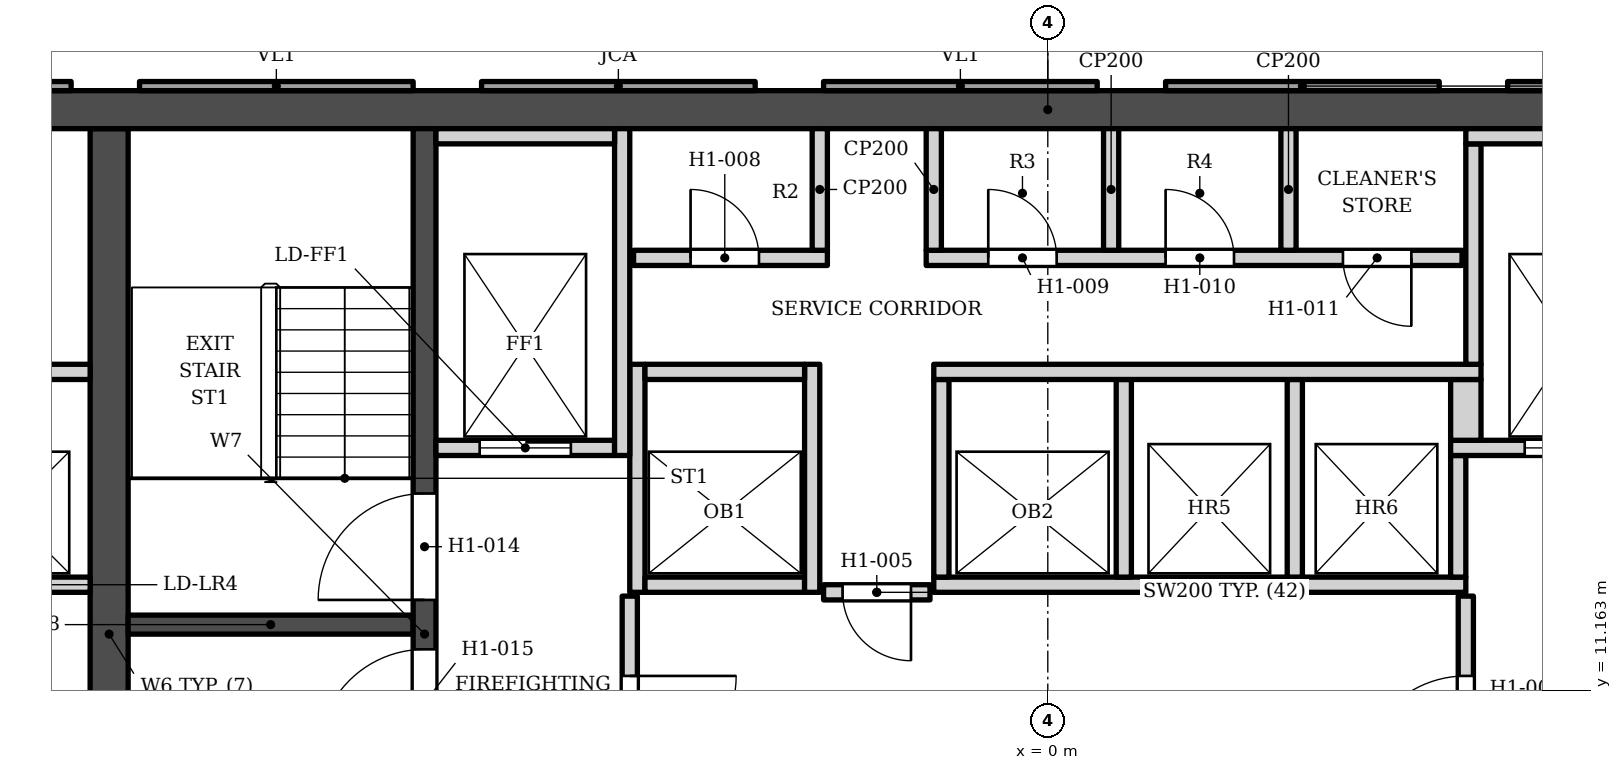
"""IFC4 building model, lengths in metres.
Left out: names, types, materials, properties, quantities, classifications, styles, units other than length and angle.
Written with IfcOpenShell. Run it as: python <this file> out.ifc"""

import sys

from ifc_helpers import new_model, si_unit, direction, frame, frame_2d, origin, place, context, subcontext, project, spatial, polyline, rectangle, outline, extrude, element, fill, save


model = new_model("IFC4")
c1 = context("Model", 3, precision=1e-05, world=origin(), true_north=direction((0.0, 1.0)))
c2 = subcontext(c1, "Body", "Model", "MODEL_VIEW")
j1 = project(units=[si_unit("LENGTHUNIT", "METRE"), si_unit("PLANEANGLEUNIT", "RADIAN")], contexts=[c1])
p1 = place(None, origin())
s1 = spatial("IfcSite", under=j1, at=p1, CompositionType="ELEMENT")
p2 = place(p1, origin())
s2 = spatial("IfcBuilding", under=s1, at=p2, CompositionType="ELEMENT")
p3 = place(p2, frame((0.0, 0.0, 46.0)))
s3 = spatial("IfcBuildingStorey", under=s2, at=p3, CompositionType="ELEMENT", Elevation=46.0)
p4 = place(p3, frame((-16.9, 18.802, 0.0), z_axis=(0.0, 0.0, 1.0), x_axis=(1.0, 0.0, 0.0)))
e1 = element("IfcWall", 1, at=p4, inside=s3, PredefinedType="SHEAR", context=c2, shape_type="SweptSolid", body=[
    extrude(rectangle(XDim=33.8, YDim=0.5, at=frame_2d((16.9, 0.0))), origin(), (0.0, 0.0, 1.0), 3.4),
])
p5 = place(p3, frame((-12.35, 5.253, 0.0), z_axis=(0.0, 0.0, 1.0), x_axis=(0.0, 1.0, 0.0)))
e2 = element("IfcWall", 2, at=p5, inside=s3, PredefinedType="SHEAR", context=c2, shape_type="SweptSolid", body=[
    extrude(rectangle(XDim=13.3, YDim=0.5, at=frame_2d((6.65, 0.0))), origin(), (0.0, 0.0, 1.0), 3.4),
])
p6 = place(p3, frame((-8.2, 5.253, 0.0), z_axis=(0.0, 0.0, 1.0), x_axis=(0.0, 1.0, 0.0)))
e3 = element("IfcWall", 3, at=p6, inside=s3, PredefinedType="SHEAR", context=c2, shape_type="SweptSolid", body=[
    extrude(rectangle(XDim=13.3, YDim=0.3, at=frame_2d((6.65, 0.0))), origin(), (0.0, 0.0, 1.0), 3.4),
])
p7 = place(p6, frame((7.1, 0.0, 0.0)))
e4 = element("IfcOpeningElement", 4, at=p7, cuts=e3, PredefinedType="OPENING", context=c2, shape_type="SweptSolid", body=[
    extrude(rectangle(XDim=1.4, YDim=2.1, at=frame_2d((0.7, 1.05))), frame((0.0, 0.16, 0.0), z_axis=(0.0, -1.0, 0.0), x_axis=(1.0, 0.0, 0.0)), (0.0, 0.0, 1.0), 0.32),
])
p8 = place(p6, frame((5.05, 0.0, 0.0)))
e5 = element("IfcOpeningElement", 5, at=p8, cuts=e3, PredefinedType="OPENING", context=c2, shape_type="SweptSolid", body=[
    extrude(rectangle(XDim=1.4, YDim=2.1, at=frame_2d((0.7, 1.05))), frame((0.0, 0.16, 0.0), z_axis=(0.0, -1.0, 0.0), x_axis=(1.0, 0.0, 0.0)), (0.0, 0.0, 1.0), 0.32),
])
p9 = place(p3, frame((-12.1, 12.028, 0.0), z_axis=(0.0, 0.0, 1.0), x_axis=(1.0, 0.0, 0.0)))
e6 = element("IfcWall", 6, at=p9, inside=s3, PredefinedType="SHEAR", context=c2, shape_type="SweptSolid", body=[
    extrude(rectangle(XDim=3.75, YDim=0.25, at=frame_2d((1.875, 0.0))), origin(), (0.0, 0.0, 1.0), 3.4),
])
p10 = place(p3, origin())
e7 = element("IfcWall", 7, at=p10, inside=s3, PredefinedType="ELEMENTEDWALL", context=c2, shape_type="SweptSolid", body=[
    extrude(outline(polyline([(6.05, 19.173), (6.05, 19.052), (9.65, 19.052), (9.65, 19.173), (6.05, 19.173)])), origin(), (0.0, 0.0, 1.0), 2.65),
])
p11 = place(p3, origin())
e8 = element("IfcWall", 8, at=p11, inside=s3, PredefinedType="SOLIDWALL", context=c2, shape_type="SweptSolid", body=[
    extrude(outline(polyline([(1.55, 19.173), (1.55, 19.052), (5.15, 19.052), (5.15, 19.173), (1.55, 19.173)])), origin(), (0.0, 0.0, 1.0), 2.65),
])
p12 = place(p3, origin())
e9 = element("IfcWall", 9, at=p12, inside=s3, PredefinedType="ELEMENTEDWALL", context=c2, shape_type="SweptSolid", body=[
    extrude(outline(polyline([(-2.95, 19.173), (-2.95, 19.052), (0.65, 19.052), (0.65, 19.173), (-2.95, 19.173)])), origin(), (0.0, 0.0, 1.0), 2.65),
])
p13 = place(p3, origin())
e10 = element("IfcWall", 10, at=p13, inside=s3, PredefinedType="SOLIDWALL", context=c2, shape_type="SweptSolid", body=[
    extrude(outline(polyline([(-7.45, 19.173), (-7.45, 19.052), (-3.85, 19.052), (-3.85, 19.173), (-7.45, 19.173)])), origin(), (0.0, 0.0, 1.0), 2.65),
])
p14 = place(p3, origin())
e11 = element("IfcWall", 11, at=p14, inside=s3, PredefinedType="ELEMENTEDWALL", context=c2, shape_type="SweptSolid", body=[
    extrude(outline(polyline([(-11.95, 19.173), (-11.95, 19.052), (-8.35, 19.052), (-8.35, 19.173), (-11.95, 19.173)])), origin(), (0.0, 0.0, 1.0), 2.65),
])
p15 = place(p3, origin())
e12 = element("IfcWall", 12, at=p15, inside=s3, PredefinedType="SOLIDWALL", context=c2, shape_type="SweptSolid", body=[
    extrude(outline(polyline([(-16.45, 19.173), (-16.45, 19.052), (-12.85, 19.052), (-12.85, 19.173), (-16.45, 19.173)])), origin(), (0.0, 0.0, 1.0), 2.65),
])
p16 = place(p3, frame((-5.5, 9.103, 0.0), z_axis=(0.0, 0.0, 1.0), x_axis=(0.0, 1.0, 0.0)))
e13 = element("IfcWall", 13, at=p16, inside=s3, PredefinedType="SOLIDWALL", context=c2, shape_type="SweptSolid", body=[
    extrude(rectangle(XDim=3.3, YDim=0.2, at=frame_2d((1.65, 0.0))), origin(), (0.0, 0.0, 1.0), 3.23),
])
p17 = place(p16, frame((0.85, 0.0, 0.0)))
e14 = element("IfcOpeningElement", 14, at=p17, cuts=e13, PredefinedType="OPENING", context=c2, shape_type="SweptSolid", body=[
    extrude(rectangle(XDim=1.4, YDim=2.1, at=frame_2d((0.7, 1.05))), frame((0.0, 0.11, 0.0), z_axis=(0.0, -1.0, 0.0), x_axis=(1.0, 0.0, 0.0)), (0.0, 0.0, 1.0), 0.22),
])
p18 = place(p3, frame((5.5, 9.103, 0.0), z_axis=(0.0, 0.0, 1.0), x_axis=(0.0, 1.0, 0.0)))
e15 = element("IfcWall", 15, at=p18, inside=s3, PredefinedType="SOLIDWALL", context=c2, shape_type="SweptSolid", body=[
    extrude(rectangle(XDim=3.3, YDim=0.2, at=frame_2d((1.65, 0.0))), origin(), (0.0, 0.0, 1.0), 3.23),
])
p19 = place(p18, frame((0.85, 0.0, 0.0)))
e16 = element("IfcOpeningElement", 16, at=p19, cuts=e15, PredefinedType="OPENING", context=c2, shape_type="SweptSolid", body=[
    extrude(rectangle(XDim=1.4, YDim=2.1, at=frame_2d((0.7, 1.05))), frame((0.0, 0.11, 0.0), z_axis=(0.0, -1.0, 0.0), x_axis=(1.0, 0.0, 0.0)), (0.0, 0.0, 1.0), 0.22),
])
p20 = place(p3, frame((-2.95, 12.453, 0.0), z_axis=(0.0, 0.0, 1.0), x_axis=(1.0, 0.0, 0.0)))
e17 = element("IfcWall", 17, at=p20, inside=s3, PredefinedType="SOLIDWALL", context=c2, shape_type="SweptSolid", body=[
    extrude(rectangle(XDim=1.4, YDim=0.2, at=frame_2d((0.7, 0.0))), origin(), (0.0, 0.0, 1.0), 3.23),
])
p21 = place(p20, frame((0.25, 0.0, 0.0)))
e18 = element("IfcOpeningElement", 18, at=p21, cuts=e17, PredefinedType="OPENING", context=c2, shape_type="SweptSolid", body=[
    extrude(rectangle(XDim=0.9, YDim=2.1, at=frame_2d((0.45, 1.05))), frame((0.0, 0.11, 0.0), z_axis=(0.0, -1.0, 0.0), x_axis=(1.0, 0.0, 0.0)), (0.0, 0.0, 1.0), 0.22),
])
p22 = place(p3, frame((-16.9, 12.552, 0.0), z_axis=(0.0, 0.0, 1.0), x_axis=(1.0, 0.0, 0.0)))
e19 = element("IfcWall", 19, at=p22, inside=s3, PredefinedType="SOLIDWALL", context=c2, shape_type="SweptSolid", body=[
    extrude(rectangle(XDim=4.3, YDim=0.2, at=frame_2d((2.15, 0.0))), origin(), (0.0, 0.0, 1.0), 3.23),
])
p23 = place(p22, frame((2.675, 0.0, 0.0)))
e20 = element("IfcOpeningElement", 20, at=p23, cuts=e19, PredefinedType="OPENING", context=c2, shape_type="SweptSolid", body=[
    extrude(rectangle(XDim=1.1, YDim=2.1, at=frame_2d((0.55, 1.05))), frame((0.0, 0.11, 0.0), z_axis=(0.0, -1.0, 0.0), x_axis=(1.0, 0.0, 0.0)), (0.0, 0.0, 1.0), 0.22),
])
p24 = place(p22, frame((0.425, 0.0, 0.0)))
e21 = element("IfcOpeningElement", 21, at=p24, cuts=e19, PredefinedType="OPENING", context=c2, shape_type="SweptSolid", body=[
    extrude(rectangle(XDim=1.1, YDim=2.1, at=frame_2d((0.55, 1.05))), frame((0.0, 0.11, 0.0), z_axis=(0.0, -1.0, 0.0), x_axis=(1.0, 0.0, 0.0)), (0.0, 0.0, 1.0), 0.22),
])
p25 = place(p3, frame((-5.4, 12.453, 0.0), z_axis=(0.0, 0.0, 1.0), x_axis=(0.0, 1.0, 0.0)))
e22 = element("IfcWall", 22, at=p25, inside=s3, PredefinedType="SOLIDWALL", context=c2, shape_type="SweptSolid", body=[
    extrude(rectangle(XDim=3.0, YDim=0.2, at=frame_2d((1.5, 0.0))), origin(), (0.0, 0.0, 1.0), 3.23),
])
p26 = place(p3, frame((-5.3, 12.552, 0.0), z_axis=(0.0, 0.0, 1.0), x_axis=(1.0, 0.0, 0.0)))
e23 = element("IfcWall", 23, at=p26, inside=s3, PredefinedType="SOLIDWALL", context=c2, shape_type="SweptSolid", body=[
    extrude(rectangle(XDim=2.1, YDim=0.2, at=frame_2d((1.05, 0.0))), origin(), (0.0, 0.0, 1.0), 3.23),
])
p27 = place(p3, frame((-3.1, 12.453, 0.0), z_axis=(0.0, 0.0, 1.0), x_axis=(0.0, 1.0, 0.0)))
e24 = element("IfcWall", 24, at=p27, inside=s3, PredefinedType="SOLIDWALL", context=c2, shape_type="SweptSolid", body=[
    extrude(rectangle(XDim=3.0, YDim=0.2, at=frame_2d((1.5, 0.0))), origin(), (0.0, 0.0, 1.0), 3.23),
])
p28 = place(p3, frame((-1.5, 12.552, 0.0), z_axis=(0.0, 0.0, 1.0), x_axis=(1.0, 0.0, 0.0)))
e25 = element("IfcWall", 25, at=p28, inside=s3, PredefinedType="SOLIDWALL", context=c2, shape_type="SweptSolid", body=[
    extrude(rectangle(XDim=7.0, YDim=0.2, at=frame_2d((3.5, 0.0))), origin(), (0.0, 0.0, 1.0), 3.23),
])
for number, where, z_axis, x_axis in (
    (26, (-1.4, 12.653, 0.0), (0.0, 0.0, 1.0), (0.0, 1.0, 0.0)),
    (27, (1.0, 12.653, 0.0), (0.0, 0.0, 1.0), (0.0, 1.0, 0.0)),
    (28, (3.25, 12.653, 0.0), (0.0, 0.0, 1.0), (0.0, 1.0, 0.0)),
):
    element("IfcWall", number, at=place(p3, frame(where, z_axis=z_axis, x_axis=x_axis)), inside=s3, PredefinedType="SOLIDWALL", context=c2, shape_type="SweptSolid", body=[
        extrude(rectangle(XDim=2.6, YDim=0.2, at=frame_2d((1.3, 0.0))), origin(), (0.0, 0.0, 1.0), 3.23),
    ])
p29 = place(p3, frame((5.4, 12.653, 0.0), z_axis=(0.0, 0.0, 1.0), x_axis=(0.0, 1.0, 0.0)))
e29 = element("IfcWall", 29, at=p29, inside=s3, PredefinedType="SOLIDWALL", context=c2, shape_type="SweptSolid", body=[
    extrude(rectangle(XDim=1.6, YDim=0.2, at=frame_2d((0.8, 0.0))), origin(), (0.0, 0.0, 1.0), 3.23),
])
p30 = place(p3, frame((-8.05, 14.353, 0.0), z_axis=(0.0, 0.0, 1.0), x_axis=(1.0, 0.0, 0.0)))
e30 = element("IfcWall", 30, at=p30, inside=s3, PredefinedType="SOLIDWALL", context=c2, shape_type="SweptSolid", body=[
    extrude(rectangle(XDim=2.35, YDim=0.2, at=frame_2d((1.175, 0.0))), origin(), (0.0, 0.0, 1.0), 3.23),
])
p31 = place(p30, frame((0.575, 0.0, 0.0)))
e31 = element("IfcOpeningElement", 31, at=p31, cuts=e30, PredefinedType="OPENING", context=c2, shape_type="SweptSolid", body=[
    extrude(rectangle(XDim=1.2, YDim=2.1, at=frame_2d((0.6, 1.05))), frame((0.0, 0.11, 0.0), z_axis=(0.0, -1.0, 0.0), x_axis=(1.0, 0.0, 0.0)), (0.0, 0.0, 1.0), 0.22),
])
p32 = place(p3, frame((-5.6, 14.253, 0.0), z_axis=(0.0, 0.0, 1.0), x_axis=(0.0, 1.0, 0.0)))
e32 = element("IfcWall", 32, at=p32, inside=s3, PredefinedType="SOLIDWALL", context=c2, shape_type="SweptSolid", body=[
    extrude(rectangle(XDim=4.3, YDim=0.2, at=frame_2d((2.15, 0.0))), origin(), (0.0, 0.0, 1.0), 3.23),
])
p33 = place(p3, frame((5.3, 14.353, 0.0), z_axis=(0.0, 0.0, 1.0), x_axis=(1.0, 0.0, 0.0)))
e33 = element("IfcWall", 33, at=p33, inside=s3, PredefinedType="SOLIDWALL", context=c2, shape_type="SweptSolid", body=[
    extrude(rectangle(XDim=2.75, YDim=0.2, at=frame_2d((1.375, 0.0))), origin(), (0.0, 0.0, 1.0), 3.23),
])
p34 = place(p33, frame((0.975, 0.0, 0.0)))
e34 = element("IfcOpeningElement", 34, at=p34, cuts=e33, PredefinedType="OPENING", context=c2, shape_type="SweptSolid", body=[
    extrude(rectangle(XDim=1.2, YDim=2.1, at=frame_2d((0.6, 1.05))), frame((0.0, 0.11, 0.0), z_axis=(0.0, -1.0, 0.0), x_axis=(1.0, 0.0, 0.0)), (0.0, 0.0, 1.0), 0.22),
])
p35 = place(p3, frame((5.5, 14.453, 0.0), z_axis=(0.0, 0.0, 1.0), x_axis=(0.0, 1.0, 0.0)))
e35 = element("IfcWall", 35, at=p35, inside=s3, PredefinedType="SOLIDWALL", context=c2, shape_type="SweptSolid", body=[
    extrude(rectangle(XDim=0.8, YDim=0.4, at=frame_2d((0.4, 0.0))), origin(), (0.0, 0.0, 1.0), 3.23),
])
p36 = place(p3, frame((-16.9, 15.353, 0.0), z_axis=(0.0, 0.0, 1.0), x_axis=(1.0, 0.0, 0.0)))
e36 = element("IfcWall", 36, at=p36, inside=s3, PredefinedType="SOLIDWALL", context=c2, shape_type="SweptSolid", body=[
    extrude(rectangle(XDim=4.3, YDim=0.2, at=frame_2d((2.15, 0.0))), origin(), (0.0, 0.0, 1.0), 3.23),
])
p37 = place(p3, frame((-5.3, 15.353, 0.0), z_axis=(0.0, 0.0, 1.0), x_axis=(1.0, 0.0, 0.0)))
e37 = element("IfcWall", 37, at=p37, inside=s3, PredefinedType="SOLIDWALL", context=c2, shape_type="SweptSolid", body=[
    extrude(rectangle(XDim=2.1, YDim=0.2, at=frame_2d((1.05, 0.0))), origin(), (0.0, 0.0, 1.0), 3.23),
])
p38 = place(p3, frame((-1.5, 15.353, 0.0), z_axis=(0.0, 0.0, 1.0), x_axis=(1.0, 0.0, 0.0)))
e38 = element("IfcWall", 38, at=p38, inside=s3, PredefinedType="SOLIDWALL", context=c2, shape_type="SweptSolid", body=[
    extrude(rectangle(XDim=7.2, YDim=0.2, at=frame_2d((3.6, 0.0))), origin(), (0.0, 0.0, 1.0), 3.23),
])
p39 = place(p3, frame((5.6, 15.453, 0.0), z_axis=(0.0, 0.0, 1.0), x_axis=(0.0, 1.0, 0.0)))
e39 = element("IfcWall", 39, at=p39, inside=s3, PredefinedType="SOLIDWALL", context=c2, shape_type="SweptSolid", body=[
    extrude(rectangle(XDim=2.9, YDim=0.2, at=frame_2d((1.45, 0.0))), origin(), (0.0, 0.0, 1.0), 3.23),
])
p40 = place(p3, frame((-5.45, 16.853, 0.0), z_axis=(0.0, 0.0, 1.0), x_axis=(1.0, 0.0, 0.0)))
e40 = element("IfcWall", 40, at=p40, inside=s3, PredefinedType="SOLIDWALL", context=c2, shape_type="SweptSolid", body=[
    extrude(rectangle(XDim=2.55, YDim=0.2, at=frame_2d((1.275, 0.0))), origin(), (0.0, 0.0, 1.0), 3.23),
])
p41 = place(p40, frame((0.75, 0.0, 0.0)))
e41 = element("IfcOpeningElement", 41, at=p41, cuts=e40, PredefinedType="OPENING", context=c2, shape_type="SweptSolid", body=[
    extrude(rectangle(XDim=0.9, YDim=2.1, at=frame_2d((0.45, 1.05))), frame((0.0, 0.11, 0.0), z_axis=(0.0, -1.0, 0.0), x_axis=(1.0, 0.0, 0.0)), (0.0, 0.0, 1.0), 0.22),
])
p42 = place(p3, frame((-1.6, 16.853, 0.0), z_axis=(0.0, 0.0, 1.0), x_axis=(1.0, 0.0, 0.0)))
e42 = element("IfcWall", 42, at=p42, inside=s3, PredefinedType="SOLIDWALL", context=c2, shape_type="SweptSolid", body=[
    extrude(rectangle(XDim=7.05, YDim=0.2, at=frame_2d((3.525, 0.0))), origin(), (0.0, 0.0, 1.0), 3.23),
])
p43 = place(p42, frame((0.817, 0.0, 0.0)))
e43 = element("IfcOpeningElement", 43, at=p43, cuts=e42, PredefinedType="OPENING", context=c2, shape_type="SweptSolid", body=[
    extrude(rectangle(XDim=0.9, YDim=2.1, at=frame_2d((0.45, 1.05))), frame((0.0, 0.11, 0.0), z_axis=(0.0, -1.0, 0.0), x_axis=(1.0, 0.0, 0.0)), (0.0, 0.0, 1.0), 0.22),
])
p44 = place(p42, frame((3.15, 0.0, 0.0)))
e44 = element("IfcOpeningElement", 44, at=p44, cuts=e42, PredefinedType="OPENING", context=c2, shape_type="SweptSolid", body=[
    extrude(rectangle(XDim=0.9, YDim=2.1, at=frame_2d((0.45, 1.05))), frame((0.0, 0.11, 0.0), z_axis=(0.0, -1.0, 0.0), x_axis=(1.0, 0.0, 0.0)), (0.0, 0.0, 1.0), 0.22),
])
p45 = place(p42, frame((5.483, 0.0, 0.0)))
e45 = element("IfcOpeningElement", 45, at=p45, cuts=e42, PredefinedType="OPENING", context=c2, shape_type="SweptSolid", body=[
    extrude(rectangle(XDim=0.9, YDim=2.1, at=frame_2d((0.45, 1.05))), frame((0.0, 0.11, 0.0), z_axis=(0.0, -1.0, 0.0), x_axis=(1.0, 0.0, 0.0)), (0.0, 0.0, 1.0), 0.22),
])
for number, where, z_axis, x_axis in (
    (46, (-3.0, 16.953, 0.0), (0.0, 0.0, 1.0), (0.0, 1.0, 0.0)),
    (47, (-1.5, 16.953, 0.0), (0.0, 0.0, 1.0), (0.0, 1.0, 0.0)),
    (48, (0.833, 16.953, 0.0), (0.0, 0.0, 1.0), (0.0, 1.0, 0.0)),
    (49, (3.167, 16.953, 0.0), (0.0, 0.0, 1.0), (0.0, 1.0, 0.0)),
):
    element("IfcWall", number, at=place(p3, frame(where, z_axis=z_axis, x_axis=x_axis)), inside=s3, PredefinedType="PARTITIONING", context=c2, shape_type="SweptSolid", body=[
        extrude(rectangle(XDim=1.6, YDim=0.2, at=frame_2d((0.8, 0.0))), origin(), (0.0, 0.0, 1.0), 3.23),
    ])
p46 = place(p3, frame((-8.05, 18.453, 0.0), z_axis=(0.0, 0.0, 1.0), x_axis=(1.0, 0.0, 0.0)))
e50 = element("IfcWall", 50, at=p46, inside=s3, PredefinedType="SOLIDWALL", context=c2, shape_type="SweptSolid", body=[
    extrude(rectangle(XDim=2.35, YDim=0.2, at=frame_2d((1.175, 0.0))), origin(), (0.0, 0.0, 1.0), 3.23),
])
p47 = place(p3, frame((5.5, 18.453, 0.0), z_axis=(0.0, 0.0, 1.0), x_axis=(1.0, 0.0, 0.0)))
e51 = element("IfcWall", 51, at=p47, inside=s3, PredefinedType="SOLIDWALL", context=c2, shape_type="SweptSolid", body=[
    extrude(rectangle(XDim=2.55, YDim=0.2, at=frame_2d((1.275, 0.0))), origin(), (0.0, 0.0, 1.0), 3.23),
])
p48 = place(p31, origin())
e52 = element("IfcDoor", 52, at=p48, inside=s3, OperationType="DOUBLE_DOOR_SLIDING", PredefinedType="DOOR", context=c2, shape_type="SweptSolid", body=[
    extrude(rectangle(XDim=1.2, YDim=2.1, at=frame_2d((0.6, 1.05))), frame((0.0, 0.025, 0.0), z_axis=(0.0, -1.0, 0.0), x_axis=(1.0, 0.0, 0.0)), (0.0, 0.0, 1.0), 0.05),
])
fill(e31, e52)
p49 = place(p34, origin())
e53 = element("IfcDoor", 53, at=p49, inside=s3, OperationType="DOUBLE_DOOR_SLIDING", PredefinedType="DOOR", context=c2, shape_type="SweptSolid", body=[
    extrude(rectangle(XDim=1.2, YDim=2.1, at=frame_2d((0.6, 1.05))), frame((0.0, 0.025, 0.0), z_axis=(0.0, -1.0, 0.0), x_axis=(1.0, 0.0, 0.0)), (0.0, 0.0, 1.0), 0.05),
])
fill(e34, e53)
p50 = place(p7, origin())
e54 = element("IfcDoor", 54, at=p50, inside=s3, OperationType="SINGLE_SWING_LEFT", PredefinedType="DOOR", context=c2, shape_type="SweptSolid", body=[
    extrude(rectangle(XDim=1.4, YDim=2.1, at=frame_2d((0.7, 1.05))), frame((0.0, 0.025, 0.0), z_axis=(0.0, -1.0, 0.0), x_axis=(1.0, 0.0, 0.0)), (0.0, 0.0, 1.0), 0.05),
])
fill(e4, e54)
p51 = place(p8, origin())
e55 = element("IfcDoor", 55, at=p51, inside=s3, OperationType="SINGLE_SWING_LEFT", PredefinedType="DOOR", context=c2, shape_type="SweptSolid", body=[
    extrude(rectangle(XDim=1.4, YDim=2.1, at=frame_2d((0.7, 1.05))), frame((0.0, 0.025, 0.0), z_axis=(0.0, -1.0, 0.0), x_axis=(1.0, 0.0, 0.0)), (0.0, 0.0, 1.0), 0.05),
])
fill(e5, e55)
p52 = place(p21, origin())
e56 = element("IfcDoor", 56, at=p52, inside=s3, OperationType="SINGLE_SWING_RIGHT", PredefinedType="DOOR", context=c2, shape_type="SweptSolid", body=[
    extrude(rectangle(XDim=0.9, YDim=2.1, at=frame_2d((0.45, 1.05))), frame((0.0, 0.025, 0.0), z_axis=(0.0, -1.0, 0.0), x_axis=(1.0, 0.0, 0.0)), (0.0, 0.0, 1.0), 0.05),
])
fill(e18, e56)
p53 = place(p17, origin())
e57 = element("IfcDoor", 57, at=p53, inside=s3, OperationType="SINGLE_SWING_RIGHT", PredefinedType="DOOR", context=c2, shape_type="SweptSolid", body=[
    extrude(rectangle(XDim=1.4, YDim=2.1, at=frame_2d((0.7, 1.05))), frame((0.0, 0.025, 0.0), z_axis=(0.0, -1.0, 0.0), x_axis=(1.0, 0.0, 0.0)), (0.0, 0.0, 1.0), 0.05),
])
fill(e14, e57)
p54 = place(p19, origin())
e58 = element("IfcDoor", 58, at=p54, inside=s3, OperationType="SINGLE_SWING_LEFT", PredefinedType="DOOR", context=c2, shape_type="SweptSolid", body=[
    extrude(rectangle(XDim=1.4, YDim=2.1, at=frame_2d((0.7, 1.05))), frame((0.0, 0.025, 0.0), z_axis=(0.0, -1.0, 0.0), x_axis=(1.0, 0.0, 0.0)), (0.0, 0.0, 1.0), 0.05),
])
fill(e16, e58)
p55 = place(p41, origin())
e59 = element("IfcDoor", 59, at=p55, inside=s3, OperationType="SINGLE_SWING_LEFT", PredefinedType="DOOR", context=c2, shape_type="SweptSolid", body=[
    extrude(rectangle(XDim=0.9, YDim=2.1, at=frame_2d((0.45, 1.05))), frame((0.0, 0.025, 0.0), z_axis=(0.0, -1.0, 0.0), x_axis=(1.0, 0.0, 0.0)), (0.0, 0.0, 1.0), 0.05),
])
fill(e41, e59)
p56 = place(p43, origin())
e60 = element("IfcDoor", 60, at=p56, inside=s3, OperationType="SINGLE_SWING_LEFT", PredefinedType="DOOR", context=c2, shape_type="SweptSolid", body=[
    extrude(rectangle(XDim=0.9, YDim=2.1, at=frame_2d((0.45, 1.05))), frame((0.0, 0.025, 0.0), z_axis=(0.0, -1.0, 0.0), x_axis=(1.0, 0.0, 0.0)), (0.0, 0.0, 1.0), 0.05),
])
fill(e43, e60)
p57 = place(p44, origin())
e61 = element("IfcDoor", 61, at=p57, inside=s3, OperationType="SINGLE_SWING_LEFT", PredefinedType="DOOR", context=c2, shape_type="SweptSolid", body=[
    extrude(rectangle(XDim=0.9, YDim=2.1, at=frame_2d((0.45, 1.05))), frame((0.0, 0.025, 0.0), z_axis=(0.0, -1.0, 0.0), x_axis=(1.0, 0.0, 0.0)), (0.0, 0.0, 1.0), 0.05),
])
fill(e44, e61)
p58 = place(p45, origin())
e62 = element("IfcDoor", 62, at=p58, inside=s3, OperationType="SINGLE_SWING_RIGHT", PredefinedType="DOOR", context=c2, shape_type="SweptSolid", body=[
    extrude(rectangle(XDim=0.9, YDim=2.1, at=frame_2d((0.45, 1.05))), frame((0.0, 0.025, 0.0), z_axis=(0.0, -1.0, 0.0), x_axis=(1.0, 0.0, 0.0)), (0.0, 0.0, 1.0), 0.05),
])
fill(e45, e62)
save(model, sys.argv[1])
